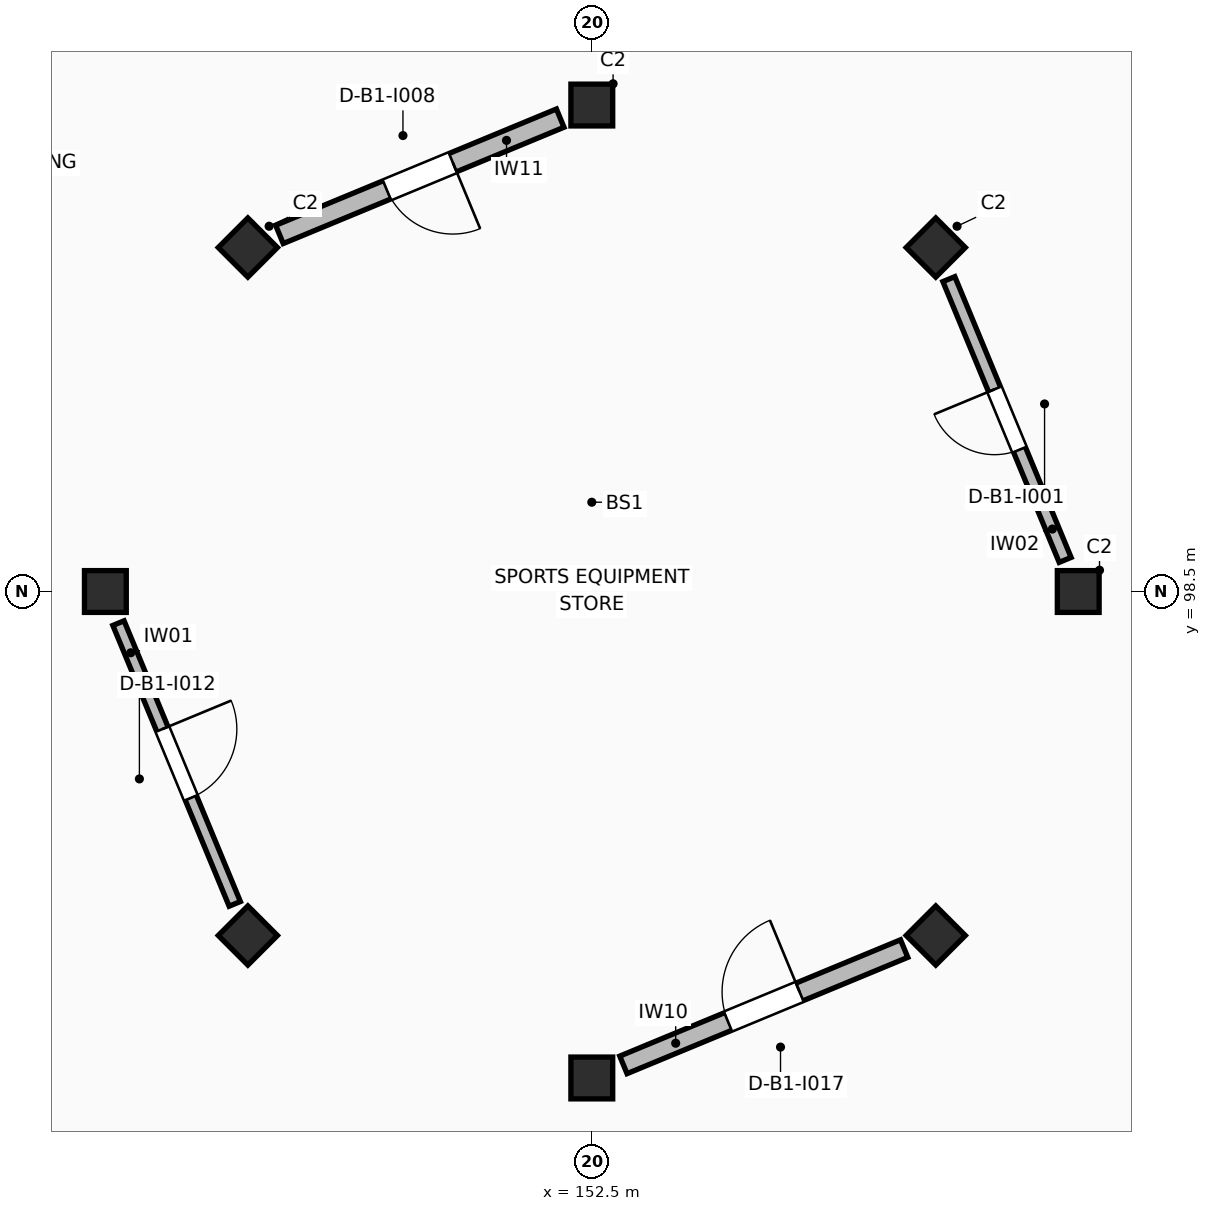
"""IFC4 building model, lengths in metres.
Left out: names, types, materials, properties, quantities, classifications, styles, units other than length and angle.
Written with IfcOpenShell. Run it as: python <this file> out.ifc"""

import sys

from ifc_helpers import new_model, si_unit, direction, frame, frame_2d, origin, origin_2d, place, context, subcontext, project, spatial, rectangle, extrude, element, fill, save


model = new_model("IFC4")
c1 = context("Model", 3, precision=1e-05, world=origin(), true_north=direction((0.0, 1.0)))
c2 = subcontext(c1, "Body", "Model", "MODEL_VIEW")
j1 = project(units=[si_unit("LENGTHUNIT", "METRE"), si_unit("PLANEANGLEUNIT", "RADIAN")], contexts=[c1])
p1 = place(None, origin())
s1 = spatial("IfcSite", under=j1, at=p1, CompositionType="ELEMENT")
p2 = place(p1, origin())
s2 = spatial("IfcBuilding", under=s1, at=p2, CompositionType="ELEMENT")
p3 = place(p2, frame((0.0, 0.0, -4.08)))
s3 = spatial("IfcBuildingStorey", under=s2, at=p3, CompositionType="ELEMENT", Elevation=-4.08)
for number, where, z_axis, x_axis in (
    (1, (158.9, 98.5, 0.0), (0.0, 0.0, 1.0), (1.0, 0.0, 0.0)),
    (2, (157.025, 103.025, 0.0), (0.0, 0.0, 1.0), (0.707, 0.707, 0.0)),
    (3, (152.5, 104.9, 0.0), (0.0, 0.0, 1.0), (0.0, 1.0, 0.0)),
    (4, (147.975, 103.025, 0.0), (0.0, 0.0, 1.0), (-0.707, 0.707, 0.0)),
    (5, (146.1, 98.5, 0.0), (0.0, 0.0, 1.0), (-1.0, 0.0, 0.0)),
    (6, (147.975, 93.975, 0.0), (0.0, 0.0, 1.0), (-0.707, -0.707, 0.0)),
    (7, (152.5, 92.1, 0.0), (0.0, 0.0, 1.0), (0.0, -1.0, 0.0)),
    (8, (157.025, 93.975, 0.0), (0.0, 0.0, 1.0), (0.707, -0.707, 0.0)),
):
    element("IfcColumn", number, at=place(p3, frame(where, z_axis=z_axis, x_axis=x_axis)), inside=s3, PredefinedType="COLUMN", context=c2, shape_type="SweptSolid", body=[
        extrude(rectangle(XDim=0.55, YDim=0.55, at=origin_2d()), origin(), (0.0, 0.0, 1.0), 4.08),
    ])
p4 = place(p3, frame((158.728, 98.916, 0.0), z_axis=(0.0, 0.0, 1.0), x_axis=(-0.382680763867, 0.923880637835, 0.0)))
e9 = element("IfcWall", 9, at=p4, inside=s3, PredefinedType="STANDARD", context=c2, shape_type="SweptSolid", body=[
    extrude(rectangle(XDim=3.998, YDim=0.17, at=frame_2d((1.999, 0.0))), origin(), (0.0, 0.0, 1.0), 2.72),
])
p5 = place(p4, frame((1.569, 0.0, 0.0)))
e10 = element("IfcOpeningElement", 10, at=p5, cuts=e9, PredefinedType="OPENING", context=c2, shape_type="SweptSolid", body=[
    extrude(rectangle(XDim=0.86, YDim=2.12, at=frame_2d((0.43, 1.06))), frame((0.0, 0.095, 0.0), z_axis=(0.0, -1.0, 0.0), x_axis=(1.0, 0.0, 0.0)), (0.0, 0.0, 1.0), 0.19),
])
p6 = place(p3, frame((152.084, 104.728, 0.0), z_axis=(0.0, 0.0, 1.0), x_axis=(-0.923880637835, -0.382680763867, 0.0)))
e11 = element("IfcWall", 11, at=p6, inside=s3, PredefinedType="STANDARD", context=c2, shape_type="SweptSolid", body=[
    extrude(rectangle(XDim=3.998, YDim=0.26, at=frame_2d((1.999, 0.0))), origin(), (0.0, 0.0, 1.0), 2.72),
])
p7 = place(p6, frame((1.529, 0.0, 0.0)))
e12 = element("IfcOpeningElement", 12, at=p7, cuts=e11, PredefinedType="OPENING", context=c2, shape_type="SweptSolid", body=[
    extrude(rectangle(XDim=0.94, YDim=2.06, at=frame_2d((0.47, 1.03))), frame((0.0, 0.14, 0.0), z_axis=(0.0, -1.0, 0.0), x_axis=(1.0, 0.0, 0.0)), (0.0, 0.0, 1.0), 0.28),
])
p8 = place(p3, frame((146.272, 98.084, 0.0), z_axis=(0.0, 0.0, 1.0), x_axis=(0.382680763867, -0.923880637835, 0.0)))
e13 = element("IfcWall", 13, at=p8, inside=s3, PredefinedType="STANDARD", context=c2, shape_type="SweptSolid", body=[
    extrude(rectangle(XDim=3.998, YDim=0.16, at=frame_2d((1.999, 0.0))), origin(), (0.0, 0.0, 1.0), 2.72),
])
p9 = place(p8, frame((1.509, 0.0, 0.0)))
e14 = element("IfcOpeningElement", 14, at=p9, cuts=e13, PredefinedType="OPENING", context=c2, shape_type="SweptSolid", body=[
    extrude(rectangle(XDim=0.98, YDim=2.06, at=frame_2d((0.49, 1.03))), frame((0.0, 0.09, 0.0), z_axis=(0.0, -1.0, 0.0), x_axis=(1.0, 0.0, 0.0)), (0.0, 0.0, 1.0), 0.18),
])
p10 = place(p3, frame((152.916, 92.272, 0.0), z_axis=(0.0, 0.0, 1.0), x_axis=(0.923880637835, 0.382680763867, 0.0)))
e15 = element("IfcWall", 15, at=p10, inside=s3, PredefinedType="STANDARD", context=c2, shape_type="SweptSolid", body=[
    extrude(rectangle(XDim=3.998, YDim=0.25, at=frame_2d((1.999, 0.0))), origin(), (0.0, 0.0, 1.0), 2.72),
])
p11 = place(p10, frame((1.489, 0.0, 0.0)))
e16 = element("IfcOpeningElement", 16, at=p11, cuts=e15, PredefinedType="OPENING", context=c2, shape_type="SweptSolid", body=[
    extrude(rectangle(XDim=1.02, YDim=2.12, at=frame_2d((0.51, 1.06))), frame((0.0, 0.135, 0.0), z_axis=(0.0, -1.0, 0.0), x_axis=(1.0, 0.0, 0.0)), (0.0, 0.0, 1.0), 0.27),
])
p12 = place(p5, frame((0.86, 0.0, 0.0), z_axis=(0.0, 0.0, 1.0), x_axis=(-1.0, 0.0, 0.0)))
e17 = element("IfcDoor", 17, at=p12, inside=s3, OperationType="SINGLE_SWING_RIGHT", PredefinedType="DOOR", context=c2, shape_type="SweptSolid", body=[
    extrude(rectangle(XDim=0.86, YDim=2.12, at=frame_2d((0.43, 1.06))), frame((0.0, 0.025, 0.0), z_axis=(0.0, -1.0, 0.0), x_axis=(1.0, 0.0, 0.0)), (0.0, 0.0, 1.0), 0.05),
])
fill(e10, e17)
p13 = place(p7, frame((0.94, 0.0, 0.0), z_axis=(0.0, 0.0, 1.0), x_axis=(-1.0, 0.0, 0.0)))
e18 = element("IfcDoor", 18, at=p13, inside=s3, OperationType="SINGLE_SWING_LEFT", PredefinedType="DOOR", context=c2, shape_type="SweptSolid", body=[
    extrude(rectangle(XDim=0.94, YDim=2.06, at=frame_2d((0.47, 1.03))), frame((0.0, 0.025, 0.0), z_axis=(0.0, -1.0, 0.0), x_axis=(1.0, 0.0, 0.0)), (0.0, 0.0, 1.0), 0.05),
])
fill(e12, e18)
p14 = place(p9, frame((0.98, 0.0, 0.0), z_axis=(0.0, 0.0, 1.0), x_axis=(-1.0, 0.0, 0.0)))
e19 = element("IfcDoor", 19, at=p14, inside=s3, OperationType="SINGLE_SWING_LEFT", PredefinedType="DOOR", context=c2, shape_type="SweptSolid", body=[
    extrude(rectangle(XDim=0.98, YDim=2.06, at=frame_2d((0.49, 1.03))), frame((0.0, 0.025, 0.0), z_axis=(0.0, -1.0, 0.0), x_axis=(1.0, 0.0, 0.0)), (0.0, 0.0, 1.0), 0.05),
])
fill(e14, e19)
p15 = place(p11, frame((1.02, 0.0, 0.0), z_axis=(0.0, 0.0, 1.0), x_axis=(-1.0, 0.0, 0.0)))
e20 = element("IfcDoor", 20, at=p15, inside=s3, OperationType="SINGLE_SWING_RIGHT", PredefinedType="DOOR", context=c2, shape_type="SweptSolid", body=[
    extrude(rectangle(XDim=1.02, YDim=2.12, at=frame_2d((0.51, 1.06))), frame((0.0, 0.025, 0.0), z_axis=(0.0, -1.0, 0.0), x_axis=(1.0, 0.0, 0.0)), (0.0, 0.0, 1.0), 0.05),
])
fill(e16, e20)
save(model, sys.argv[1])
